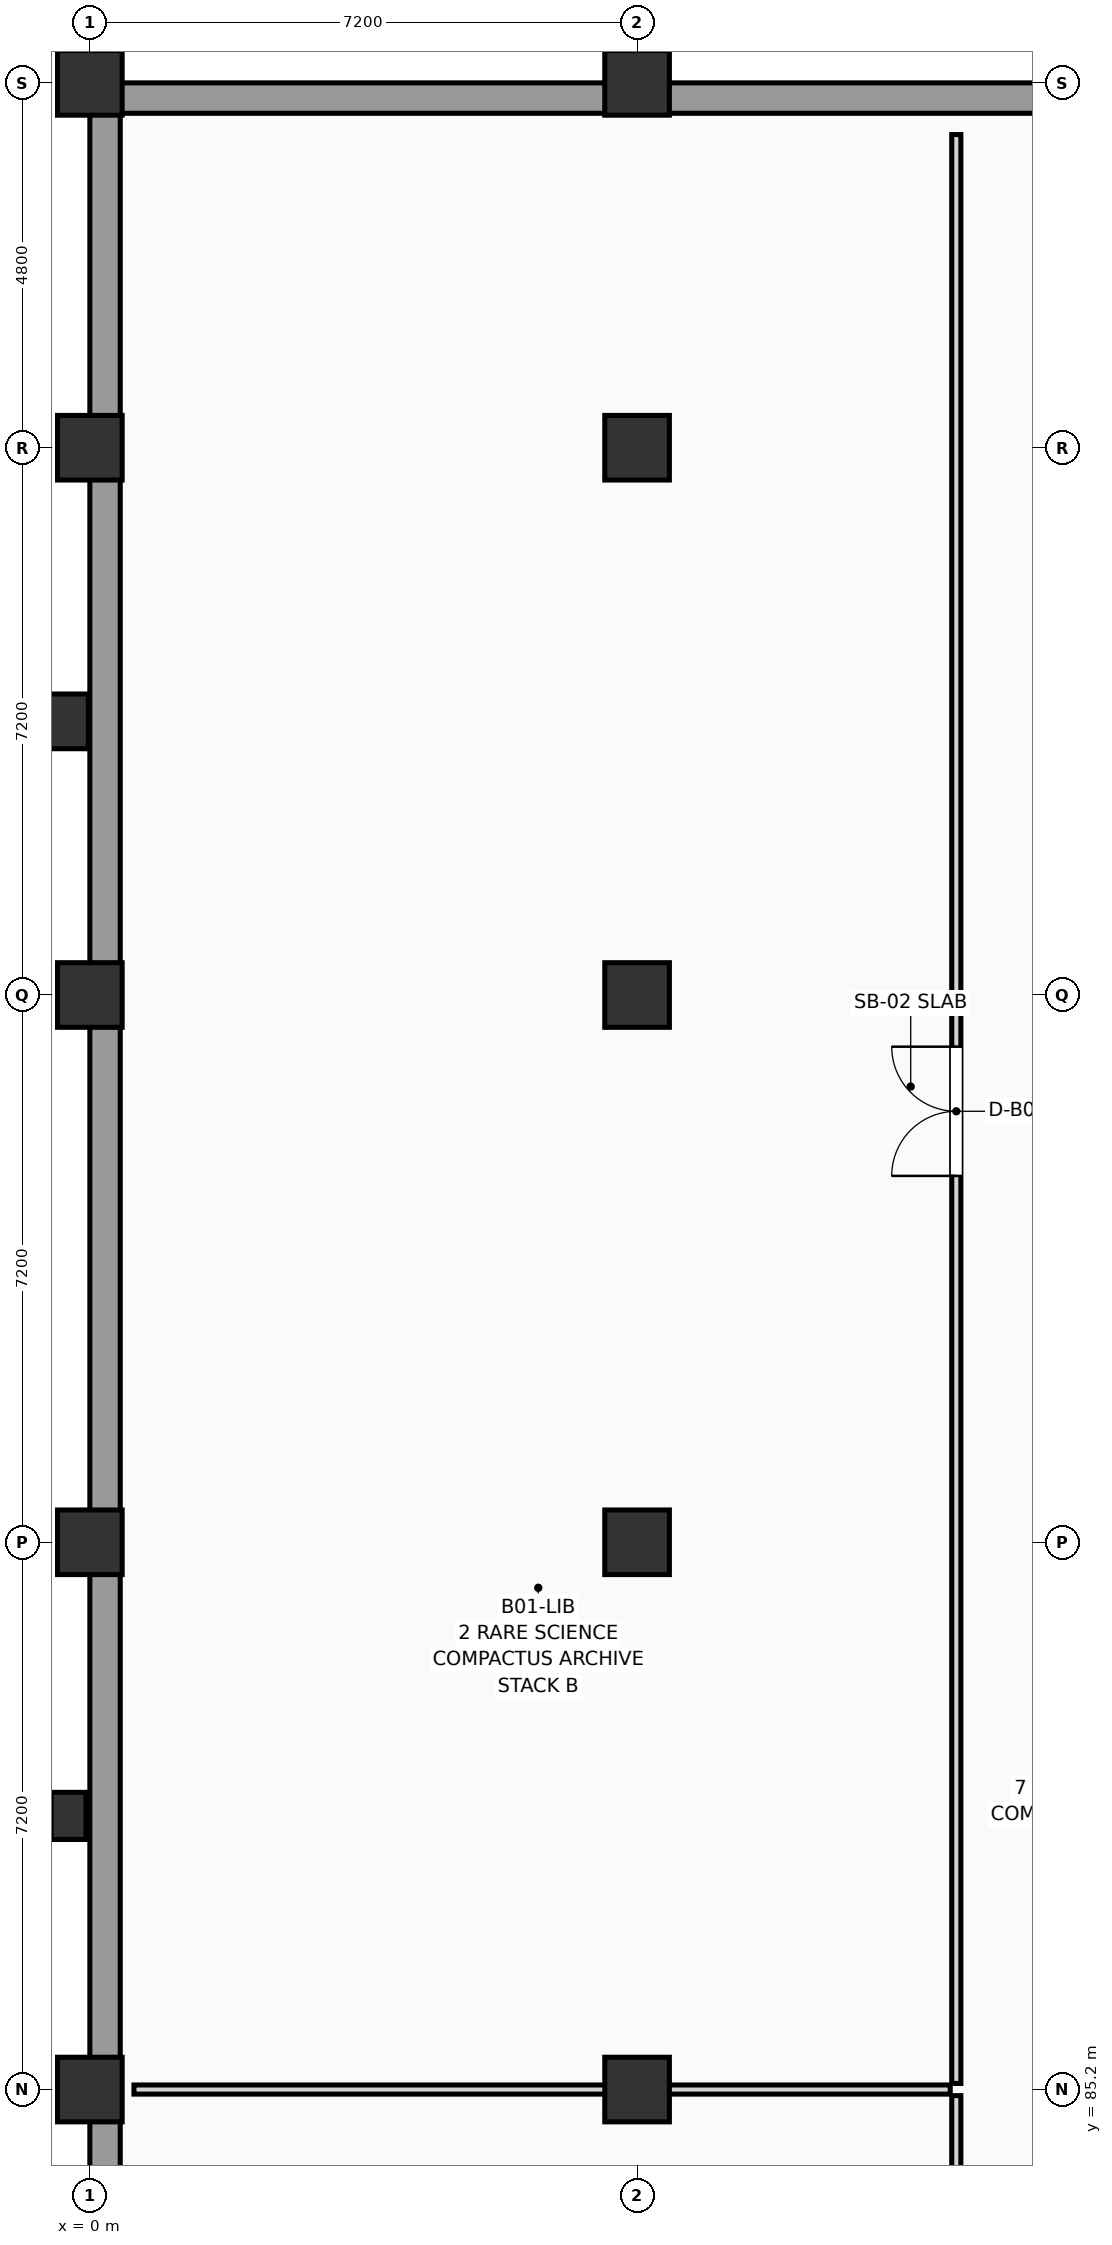
"""IFC4 building model, lengths in metres.
Left out: names, types, materials, properties, quantities, classifications, styles, units other than length and angle.
Written with IfcOpenShell. Run it as: python <this file> out.ifc"""

import sys

from ifc_helpers import new_model, si_unit, direction, frame, frame_2d, origin, origin_2d, place, context, subcontext, project, spatial, rectangle, extrude, element, fill, save


model = new_model("IFC4")
c1 = context("Model", 3, precision=1e-05, world=origin(), true_north=direction((0.0, 1.0)))
c2 = subcontext(c1, "Body", "Model", "MODEL_VIEW")
j1 = project(units=[si_unit("LENGTHUNIT", "METRE"), si_unit("PLANEANGLEUNIT", "RADIAN")], contexts=[c1])
p1 = place(None, origin())
s1 = spatial("IfcSite", under=j1, at=p1, CompositionType="ELEMENT")
p2 = place(p1, origin())
s2 = spatial("IfcBuilding", under=s1, at=p2, CompositionType="ELEMENT")
p3 = place(p2, frame((0.0, 0.0, -4.5)))
s3 = spatial("IfcBuildingStorey", under=s2, at=p3, CompositionType="ELEMENT", Elevation=-4.5)
for number, where, z_axis, x_axis in (
    (1, (0.0, 85.2, -0.28), (0.0, 0.0, 1.0), (1.0, 0.0, 0.0)),
    (2, (0.0, 92.4, -0.28), (0.0, 0.0, 1.0), (1.0, 0.0, 0.0)),
    (3, (0.0, 99.6, -0.28), (0.0, 0.0, 1.0), (1.0, 0.0, 0.0)),
    (4, (0.0, 106.8, -0.28), (0.0, 0.0, 1.0), (1.0, 0.0, 0.0)),
    (5, (0.0, 111.6, -0.28), (0.0, 0.0, 1.0), (1.0, 0.0, 0.0)),
    (6, (7.2, 85.2, -0.28), (0.0, 0.0, 1.0), (1.0, 0.0, 0.0)),
    (7, (7.2, 92.4, -0.28), (0.0, 0.0, 1.0), (1.0, 0.0, 0.0)),
    (8, (7.2, 99.6, -0.28), (0.0, 0.0, 1.0), (1.0, 0.0, 0.0)),
    (9, (7.2, 106.8, -0.28), (0.0, 0.0, 1.0), (1.0, 0.0, 0.0)),
    (10, (7.2, 111.6, -0.28), (0.0, 0.0, 1.0), (1.0, 0.0, 0.0)),
):
    element("IfcColumn", number, at=place(p3, frame(where, z_axis=z_axis, x_axis=x_axis)), inside=s3, PredefinedType="COLUMN", context=c2, shape_type="SweptSolid", body=[
        extrude(rectangle(XDim=0.85, YDim=0.85, at=origin_2d()), origin(), (0.0, 0.0, 1.0), 4.78),
    ])
p4 = place(p3, frame((-0.28, 88.8, -0.28), z_axis=(0.0, 0.0, 1.0), x_axis=(1.0, 0.0, 0.0)))
e11 = element("IfcColumn", 11, at=p4, inside=s3, PredefinedType="PILASTER", context=c2, shape_type="SweptSolid", body=[
    extrude(rectangle(XDim=0.46, YDim=0.62, at=origin_2d()), origin(), (0.0, 0.0, 1.0), 4.78),
])
p5 = place(p3, frame((-0.28, 103.2, -0.28), z_axis=(0.0, 0.0, 1.0), x_axis=(1.0, 0.0, 0.0)))
e12 = element("IfcColumn", 12, at=p5, inside=s3, PredefinedType="PILASTER", context=c2, shape_type="SweptSolid", body=[
    extrude(rectangle(XDim=0.52, YDim=0.72, at=origin_2d()), origin(), (0.0, 0.0, 1.0), 4.78),
])
p6 = place(p3, frame((0.2, 56.4, -0.3), z_axis=(0.0, 0.0, 1.0), x_axis=(0.0, 1.0, 0.0)))
e13 = element("IfcWall", 13, at=p6, inside=s3, PredefinedType="USERDEFINED", context=c2, shape_type="SweptSolid", body=[
    extrude(rectangle(XDim=28.8, YDim=0.4, at=frame_2d((14.4, 0.0))), origin(), (0.0, 0.0, 1.0), 4.54),
])
p7 = place(p3, frame((0.2, 85.2, -0.3), z_axis=(0.0, 0.0, 1.0), x_axis=(0.0, 1.0, 0.0)))
e14 = element("IfcWall", 14, at=p7, inside=s3, PredefinedType="USERDEFINED", context=c2, shape_type="SweptSolid", body=[
    extrude(rectangle(XDim=26.4, YDim=0.4, at=frame_2d((13.2, 0.0))), origin(), (0.0, 0.0, 1.0), 4.54),
])
p8 = place(p3, frame((0.0, 111.4, -0.3), z_axis=(0.0, 0.0, 1.0), x_axis=(1.0, 0.0, 0.0)))
e15 = element("IfcWall", 15, at=p8, inside=s3, PredefinedType="USERDEFINED", context=c2, shape_type="SweptSolid", body=[
    extrude(rectangle(XDim=21.6, YDim=0.4, at=frame_2d((10.8, 0.0))), origin(), (0.0, 0.0, 1.0), 4.54),
])
p9 = place(p3, frame((11.4, 56.68, 0.0), z_axis=(0.0, 0.0, 1.0), x_axis=(0.0, 1.0, 0.0)))
e16 = element("IfcWall", 16, at=p9, inside=s3, PredefinedType="PARTITIONING", context=c2, shape_type="SweptSolid", body=[
    extrude(rectangle(XDim=28.44, YDim=0.12, at=frame_2d((14.22, 0.0))), origin(), (0.0, 0.0, 1.0), 4.225),
])
p10 = place(p9, frame((13.37, 0.0, 0.0)))
e17 = element("IfcOpeningElement", 17, at=p10, cuts=e16, PredefinedType="OPENING", context=c2, shape_type="SweptSolid", body=[
    extrude(rectangle(XDim=1.7, YDim=2.28, at=frame_2d((0.85, 1.14))), frame((0.0, 0.072, 0.0), z_axis=(0.0, -1.0, 0.0), x_axis=(1.0, 0.0, 0.0)), (0.0, 0.0, 1.0), 0.144),
])
p11 = place(p3, frame((0.58, 85.2, 0.0), z_axis=(0.0, 0.0, 1.0), x_axis=(1.0, 0.0, 0.0)))
e18 = element("IfcWall", 18, at=p11, inside=s3, PredefinedType="PARTITIONING", context=c2, shape_type="SweptSolid", body=[
    extrude(rectangle(XDim=10.74, YDim=0.12, at=frame_2d((5.37, 0.0))), origin(), (0.0, 0.0, 1.0), 3.375),
])
p12 = place(p3, frame((11.4, 85.28, 0.0), z_axis=(0.0, 0.0, 1.0), x_axis=(0.0, 1.0, 0.0)))
e19 = element("IfcWall", 19, at=p12, inside=s3, PredefinedType="PARTITIONING", context=c2, shape_type="SweptSolid", body=[
    extrude(rectangle(XDim=25.64, YDim=0.12, at=frame_2d((12.82, 0.0))), origin(), (0.0, 0.0, 1.0), 4.225),
])
p13 = place(p12, frame((11.94, 0.0, 0.0)))
e20 = element("IfcOpeningElement", 20, at=p13, cuts=e19, PredefinedType="OPENING", context=c2, shape_type="SweptSolid", body=[
    extrude(rectangle(XDim=1.7, YDim=2.28, at=frame_2d((0.85, 1.14))), frame((0.0, 0.072, 0.0), z_axis=(0.0, -1.0, 0.0), x_axis=(1.0, 0.0, 0.0)), (0.0, 0.0, 1.0), 0.144),
])
p14 = place(p13, origin())
e21 = element("IfcDoor", 21, at=p14, inside=s3, OperationType="DOUBLE_DOOR_SINGLE_SWING", PredefinedType="DOOR", context=c2, shape_type="SweptSolid", body=[
    extrude(rectangle(XDim=1.7, YDim=2.28, at=frame_2d((0.85, 1.14))), frame((0.0, 0.025, 0.0), z_axis=(0.0, -1.0, 0.0), x_axis=(1.0, 0.0, 0.0)), (0.0, 0.0, 1.0), 0.05),
])
fill(e20, e21)
save(model, sys.argv[1])
